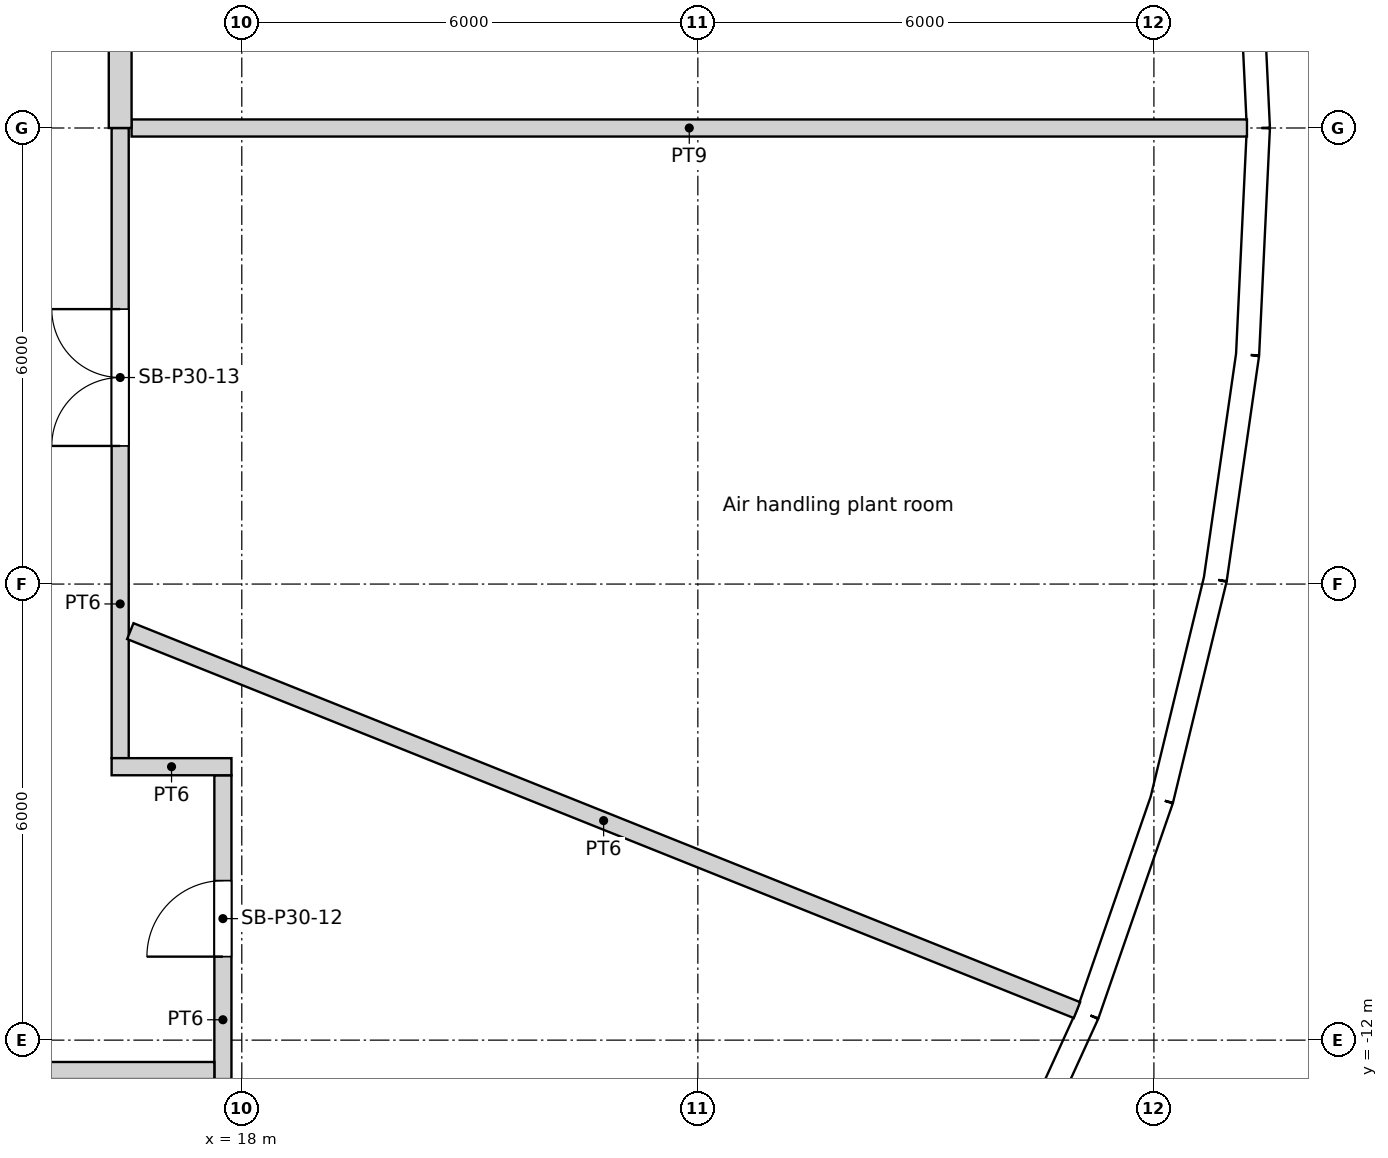
"""IFC4 building model, lengths in metres.
Left out: names, types, materials, properties, quantities, classifications, styles, units other than length and angle.
Written with IfcOpenShell. Run it as: python <this file> out.ifc"""

import sys

from ifc_helpers import new_model, si_unit, direction, frame, frame_2d, origin, origin_2d, place, context, subcontext, project, spatial, rectangle, circle, extrude, element, fill, save


model = new_model("IFC4")
c1 = context("Model", 3, precision=1e-05, world=origin(), true_north=direction((0.0, 1.0)))
c2 = subcontext(c1, "Body", "Model", "MODEL_VIEW")
j1 = project(units=[si_unit("LENGTHUNIT", "METRE"), si_unit("PLANEANGLEUNIT", "RADIAN")], contexts=[c1])
p1 = place(None, origin())
s1 = spatial("IfcSite", under=j1, at=p1, CompositionType="ELEMENT")
p2 = place(p1, origin())
s2 = spatial("IfcBuilding", under=s1, at=p2, CompositionType="ELEMENT")
p3 = place(p2, frame((0.0, 0.0, 120.0)))
s3 = spatial("IfcBuildingStorey", under=s2, at=p3, CompositionType="ELEMENT", Elevation=120.0)
for number, where, z_axis, x_axis in (
    (1, (30.275, 0.0, 0.0), (0.0, 0.0, 1.0), (1.0, 0.0, 0.0)),
    (2, (28.106, -11.252, 0.0), (0.0, 0.0, 1.0), (1.0, 0.0, 0.0)),
    (3, (29.728, -5.729, 0.0), (0.0, 0.0, 1.0), (1.0, 0.0, 0.0)),
):
    element("IfcColumn", number, at=place(p3, frame(where, z_axis=z_axis, x_axis=x_axis)), inside=s3, PredefinedType="COLUMN", context=c2, shape_type="SweptSolid", body=[
        extrude(circle(Radius=0.6, at=origin_2d()), origin(), (0.0, 0.0, 1.0), 6.0),
    ])
for number, where, z_axis, x_axis in (
    (4, (24.548, 0.0, 0.0), (0.0, 0.0, 1.0), (1.0, 0.0, 0.0)),
    (5, (21.937, -11.017, 0.0), (0.0, 0.0, 1.0), (1.0, 0.0, 0.0)),
    (6, (23.886, -5.661, 0.0), (0.0, 0.0, 1.0), (1.0, 0.0, 0.0)),
):
    element("IfcColumn", number, at=place(p3, frame(where, z_axis=z_axis, x_axis=x_axis)), inside=s3, PredefinedType="COLUMN", context=c2, shape_type="SweptSolid", body=[
        extrude(circle(Radius=0.65, at=origin_2d()), origin(), (0.0, 0.0, 1.0), 6.0),
    ])
for number, where, z_axis, x_axis in (
    (7, (18.822, 0.0, 0.0), (0.0, 0.0, 1.0), (1.0, 0.0, 0.0)),
    (8, (15.552, -10.603, 0.0), (0.0, 0.0, 1.0), (1.0, 0.0, 0.0)),
    (9, (17.986, -5.548, 0.0), (0.0, 0.0, 1.0), (1.0, 0.0, 0.0)),
):
    element("IfcColumn", number, at=place(p3, frame(where, z_axis=z_axis, x_axis=x_axis)), inside=s3, PredefinedType="COLUMN", context=c2, shape_type="SweptSolid", body=[
        extrude(circle(Radius=0.7, at=origin_2d()), origin(), (0.0, 0.0, 1.0), 6.0),
    ])
p4 = place(p3, frame((31.375, 0.0, 0.0), z_axis=(0.0, 0.0, 1.0), x_axis=(-0.047588458579, 0.998867027492, 0.0)))
e10 = element("IfcWall", 10, at=p4, inside=s3, PredefinedType="SOLIDWALL", context=c2, shape_type="SweptSolid", body=[
    extrude(rectangle(XDim=2.986, YDim=0.3, at=frame_2d((1.493, 0.0))), origin(), (0.0, 0.0, 1.0), 5.7),
])
p5 = place(p4, frame((1.493, 0.0, 1.8)))
e11 = element("IfcOpeningElement", 11, at=p5, cuts=e10, PredefinedType="OPENING", context=c2, shape_type="SweptSolid", body=[
    extrude(circle(Radius=1.2, at=origin_2d()), frame((0.0, 0.16, 0.0), z_axis=(0.0, -1.0, 0.0), x_axis=(1.0, 0.0, 0.0)), (0.0, 0.0, 1.0), 0.32),
])
p6 = place(p3, frame((27.887, -14.377, 0.0), z_axis=(0.0, 0.0, 1.0), x_axis=(0.415373250944, 0.909651066289, 0.0)))
e12 = element("IfcWall", 12, at=p6, inside=s3, PredefinedType="SOLIDWALL", context=c2, shape_type="SweptSolid", body=[
    extrude(rectangle(XDim=2.986, YDim=0.3, at=frame_2d((1.493, 0.0))), origin(), (0.0, 0.0, 1.0), 5.7),
])
p7 = place(p6, frame((1.493, 0.0, 1.8)))
e13 = element("IfcOpeningElement", 13, at=p7, cuts=e12, PredefinedType="OPENING", context=c2, shape_type="SweptSolid", body=[
    extrude(circle(Radius=1.2, at=origin_2d()), frame((0.0, 0.16, 0.0), z_axis=(0.0, -1.0, 0.0), x_axis=(1.0, 0.0, 0.0)), (0.0, 0.0, 1.0), 0.32),
])
p8 = place(p3, frame((29.127, -11.661, 0.0), z_axis=(0.0, 0.0, 1.0), x_axis=(0.327074054052, 0.944998710669, 0.0)))
e14 = element("IfcWall", 14, at=p8, inside=s3, PredefinedType="SOLIDWALL", context=c2, shape_type="SweptSolid", body=[
    extrude(rectangle(XDim=2.986, YDim=0.3, at=frame_2d((1.493, 0.0))), origin(), (0.0, 0.0, 1.0), 5.7),
])
p9 = place(p8, frame((1.493, 0.0, 1.8)))
e15 = element("IfcOpeningElement", 15, at=p9, cuts=e14, PredefinedType="OPENING", context=c2, shape_type="SweptSolid", body=[
    extrude(circle(Radius=1.2, at=origin_2d()), frame((0.0, 0.16, 0.0), z_axis=(0.0, -1.0, 0.0), x_axis=(1.0, 0.0, 0.0)), (0.0, 0.0, 1.0), 0.32),
])
p10 = place(p3, frame((30.104, -8.839, 0.0), z_axis=(0.0, 0.0, 1.0), x_axis=(0.235756834479, 0.971812078026, 0.0)))
e16 = element("IfcWall", 16, at=p10, inside=s3, PredefinedType="SOLIDWALL", context=c2, shape_type="SweptSolid", body=[
    extrude(rectangle(XDim=2.986, YDim=0.3, at=frame_2d((1.493, 0.0))), origin(), (0.0, 0.0, 1.0), 5.7),
])
p11 = place(p10, frame((1.493, 0.0, 1.8)))
e17 = element("IfcOpeningElement", 17, at=p11, cuts=e16, PredefinedType="OPENING", context=c2, shape_type="SweptSolid", body=[
    extrude(circle(Radius=1.2, at=origin_2d()), frame((0.0, 0.16, 0.0), z_axis=(0.0, -1.0, 0.0), x_axis=(1.0, 0.0, 0.0)), (0.0, 0.0, 1.0), 0.32),
])
p12 = place(p3, frame((30.807, -5.938, 0.0), z_axis=(0.0, 0.0, 1.0), x_axis=(0.142360001917, 0.989814947278, 0.0)))
e18 = element("IfcWall", 18, at=p12, inside=s3, PredefinedType="SOLIDWALL", context=c2, shape_type="SweptSolid", body=[
    extrude(rectangle(XDim=2.986, YDim=0.3, at=frame_2d((1.493, 0.0))), origin(), (0.0, 0.0, 1.0), 5.7),
])
p13 = place(p12, frame((1.493, 0.0, 1.8)))
e19 = element("IfcOpeningElement", 19, at=p13, cuts=e18, PredefinedType="OPENING", context=c2, shape_type="SweptSolid", body=[
    extrude(circle(Radius=1.2, at=origin_2d()), frame((0.0, 0.16, 0.0), z_axis=(0.0, -1.0, 0.0), x_axis=(1.0, 0.0, 0.0)), (0.0, 0.0, 1.0), 0.32),
])
p14 = place(p3, frame((31.232, -2.982, 0.0), z_axis=(0.0, 0.0, 1.0), x_axis=(0.047588458579, 0.998867027492, 0.0)))
e20 = element("IfcWall", 20, at=p14, inside=s3, PredefinedType="SOLIDWALL", context=c2, shape_type="SweptSolid", body=[
    extrude(rectangle(XDim=2.986, YDim=0.3, at=frame_2d((1.493, 0.0))), origin(), (0.0, 0.0, 1.0), 5.7),
])
p15 = place(p14, frame((1.493, 0.0, 1.8)))
e21 = element("IfcOpeningElement", 21, at=p15, cuts=e20, PredefinedType="OPENING", context=c2, shape_type="SweptSolid", body=[
    extrude(circle(Radius=1.2, at=origin_2d()), frame((0.0, 0.16, 0.0), z_axis=(0.0, -1.0, 0.0), x_axis=(1.0, 0.0, 0.0)), (0.0, 0.0, 1.0), 0.32),
])
p16 = place(p3, frame((4.411, -12.4, 0.0), z_axis=(0.0, 0.0, 1.0), x_axis=(1.0, 0.0, 0.0)))
e22 = element("IfcWall", 22, at=p16, inside=s3, PredefinedType="PARTITIONING", context=c2, shape_type="SweptSolid", body=[
    extrude(rectangle(XDim=13.229, YDim=0.225, at=frame_2d((6.614, 0.0))), origin(), (0.0, 0.0, 1.0), 5.2),
])
p17 = place(p16, frame((3.738, 0.0, 0.0)))
e23 = element("IfcOpeningElement", 23, at=p17, cuts=e22, PredefinedType="OPENING", context=c2, shape_type="SweptSolid", body=[
    extrude(rectangle(XDim=1.0, YDim=2.1, at=frame_2d((0.5, 1.05))), frame((0.0, 0.113, 0.0), z_axis=(0.0, -1.0, 0.0), x_axis=(1.0, 0.0, 0.0)), (0.0, 0.0, 1.0), 0.225),
])
p18 = place(p3, frame((16.4, -8.29, 0.0), z_axis=(0.0, 0.0, 1.0), x_axis=(0.0, 1.0, 0.0)))
e24 = element("IfcWall", 24, at=p18, inside=s3, PredefinedType="PARTITIONING", context=c2, shape_type="SweptSolid", body=[
    extrude(rectangle(XDim=8.29, YDim=0.225, at=frame_2d((4.145, 0.0))), origin(), (0.0, 0.0, 1.0), 5.2),
])
p19 = place(p18, frame((4.108, 0.0, 0.0)))
e25 = element("IfcOpeningElement", 25, at=p19, cuts=e24, PredefinedType="OPENING", context=c2, shape_type="SweptSolid", body=[
    extrude(rectangle(XDim=1.8, YDim=2.4, at=frame_2d((0.9, 1.2))), frame((0.0, 0.113, 0.0), z_axis=(0.0, -1.0, 0.0), x_axis=(1.0, 0.0, 0.0)), (0.0, 0.0, 1.0), 0.225),
])
p20 = place(p3, frame((16.4, 0.0, 0.0), z_axis=(0.0, 0.0, 1.0), x_axis=(0.0, 1.0, 0.0)))
e26 = element("IfcWall", 26, at=p20, inside=s3, PredefinedType="PARTITIONING", context=c2, shape_type="SweptSolid", body=[
    extrude(rectangle(XDim=8.253, YDim=0.3, at=frame_2d((4.126, 0.0))), origin(), (0.0, 0.0, 1.0), 5.2),
])
p21 = place(p20, frame((2.383, 0.0, 0.0)))
e27 = element("IfcOpeningElement", 27, at=p21, cuts=e26, PredefinedType="OPENING", context=c2, shape_type="SweptSolid", body=[
    extrude(rectangle(XDim=1.8, YDim=2.4, at=frame_2d((0.9, 1.2))), frame((0.0, 0.15, 0.0), z_axis=(0.0, -1.0, 0.0), x_axis=(1.0, 0.0, 0.0)), (0.0, 0.0, 1.0), 0.3),
])
p22 = place(p3, frame((17.752, -12.512, 0.0), z_axis=(0.0, 0.0, 1.0), x_axis=(0.0, 1.0, 0.0)))
e28 = element("IfcWall", 28, at=p22, inside=s3, PredefinedType="PARTITIONING", context=c2, shape_type="SweptSolid", body=[
    extrude(rectangle(XDim=3.997, YDim=0.225, at=frame_2d((1.999, 0.0))), origin(), (0.0, 0.0, 1.0), 5.2),
])
p23 = place(p22, frame((1.611, 0.0, 0.0)))
e29 = element("IfcOpeningElement", 29, at=p23, cuts=e28, PredefinedType="OPENING", context=c2, shape_type="SweptSolid", body=[
    extrude(rectangle(XDim=1.0, YDim=2.1, at=frame_2d((0.5, 1.05))), frame((0.0, 0.113, 0.0), z_axis=(0.0, -1.0, 0.0), x_axis=(1.0, 0.0, 0.0)), (0.0, 0.0, 1.0), 0.225),
])
p24 = place(p3, frame((17.864, -8.403, 0.0), z_axis=(0.0, 0.0, 1.0), x_axis=(-1.0, 0.0, 0.0)))
e30 = element("IfcWall", 30, at=p24, inside=s3, PredefinedType="PARTITIONING", context=c2, shape_type="SweptSolid", body=[
    extrude(rectangle(XDim=1.576, YDim=0.225, at=frame_2d((0.788, 0.0))), origin(), (0.0, 0.0, 1.0), 5.2),
])
p25 = place(p3, frame((22.598, -21.547, 0.0), z_axis=(0.0, 0.0, 1.0), x_axis=(-0.72374624757, 0.690066206337, 0.0)))
e31 = element("IfcWall", 31, at=p25, inside=s3, PredefinedType="PARTITIONING", context=c2, shape_type="SweptSolid", body=[
    extrude(rectangle(XDim=13.033, YDim=0.225, at=frame_2d((6.517, 0.0))), origin(), (0.0, 0.0, 1.0), 2.7),
])
p26 = place(p3, frame((28.988, -11.605, 0.0), z_axis=(0.0, 0.0, 1.0), x_axis=(-0.928362433176, 0.371676193303, 0.0)))
e32 = element("IfcWall", 32, at=p26, inside=s3, PredefinedType="PARTITIONING", context=c2, shape_type="SweptSolid", body=[
    extrude(rectangle(XDim=13.415, YDim=0.225, at=frame_2d((6.708, 0.0))), origin(), (0.0, 0.0, 1.0), 5.2),
])
p27 = place(p3, frame((31.224, 0.0, 0.0), z_axis=(0.0, 0.0, 1.0), x_axis=(-1.0, 0.0, 0.0)))
e33 = element("IfcWall", 33, at=p27, inside=s3, PredefinedType="PARTITIONING", context=c2, shape_type="SweptSolid", body=[
    extrude(rectangle(XDim=14.674, YDim=0.225, at=frame_2d((7.337, 0.0))), origin(), (0.0, 0.0, 1.0), 2.7),
])
p28 = place(p5, origin())
e34 = element("IfcWindow", 34, at=p28, inside=s3, PartitioningType="SINGLE_PANEL", PredefinedType="WINDOW", context=c2, shape_type="SweptSolid", body=[
    extrude(circle(Radius=1.2, at=origin_2d()), frame((0.0, 0.12, 0.0), z_axis=(0.0, -1.0, 0.0), x_axis=(1.0, 0.0, 0.0)), (0.0, 0.0, 1.0), 0.1),
])
fill(e11, e34)
p29 = place(p7, origin())
e35 = element("IfcWindow", 35, at=p29, inside=s3, PartitioningType="SINGLE_PANEL", PredefinedType="WINDOW", context=c2, shape_type="SweptSolid", body=[
    extrude(circle(Radius=1.2, at=origin_2d()), frame((0.0, 0.12, 0.0), z_axis=(0.0, -1.0, 0.0), x_axis=(1.0, 0.0, 0.0)), (0.0, 0.0, 1.0), 0.1),
])
fill(e13, e35)
p30 = place(p9, origin())
e36 = element("IfcWindow", 36, at=p30, inside=s3, PartitioningType="SINGLE_PANEL", PredefinedType="WINDOW", context=c2, shape_type="SweptSolid", body=[
    extrude(circle(Radius=1.2, at=origin_2d()), frame((0.0, 0.12, 0.0), z_axis=(0.0, -1.0, 0.0), x_axis=(1.0, 0.0, 0.0)), (0.0, 0.0, 1.0), 0.1),
])
fill(e15, e36)
p31 = place(p11, origin())
e37 = element("IfcWindow", 37, at=p31, inside=s3, PartitioningType="SINGLE_PANEL", PredefinedType="WINDOW", context=c2, shape_type="SweptSolid", body=[
    extrude(circle(Radius=1.2, at=origin_2d()), frame((0.0, 0.12, 0.0), z_axis=(0.0, -1.0, 0.0), x_axis=(1.0, 0.0, 0.0)), (0.0, 0.0, 1.0), 0.1),
])
fill(e17, e37)
p32 = place(p13, origin())
e38 = element("IfcWindow", 38, at=p32, inside=s3, PartitioningType="SINGLE_PANEL", PredefinedType="WINDOW", context=c2, shape_type="SweptSolid", body=[
    extrude(circle(Radius=1.2, at=origin_2d()), frame((0.0, 0.12, 0.0), z_axis=(0.0, -1.0, 0.0), x_axis=(1.0, 0.0, 0.0)), (0.0, 0.0, 1.0), 0.1),
])
fill(e19, e38)
p33 = place(p15, origin())
e39 = element("IfcWindow", 39, at=p33, inside=s3, PartitioningType="SINGLE_PANEL", PredefinedType="WINDOW", context=c2, shape_type="SweptSolid", body=[
    extrude(circle(Radius=1.2, at=origin_2d()), frame((0.0, 0.12, 0.0), z_axis=(0.0, -1.0, 0.0), x_axis=(1.0, 0.0, 0.0)), (0.0, 0.0, 1.0), 0.1),
])
fill(e21, e39)
p34 = place(p23, origin())
e40 = element("IfcDoor", 40, at=p34, inside=s3, OperationType="SINGLE_SWING_LEFT", PredefinedType="DOOR", context=c2, shape_type="SweptSolid", body=[
    extrude(rectangle(XDim=1.0, YDim=2.1, at=frame_2d((0.5, 1.05))), frame((0.0, 0.025, 0.0), z_axis=(0.0, -1.0, 0.0), x_axis=(1.0, 0.0, 0.0)), (0.0, 0.0, 1.0), 0.05),
])
fill(e29, e40)
p35 = place(p19, origin())
e41 = element("IfcDoor", 41, at=p35, inside=s3, OperationType="DOUBLE_DOOR_SINGLE_SWING", PredefinedType="DOOR", context=c2, shape_type="SweptSolid", body=[
    extrude(rectangle(XDim=1.8, YDim=2.4, at=frame_2d((0.9, 1.2))), frame((0.0, 0.025, 0.0), z_axis=(0.0, -1.0, 0.0), x_axis=(1.0, 0.0, 0.0)), (0.0, 0.0, 1.0), 0.05),
])
fill(e25, e41)
save(model, sys.argv[1])
